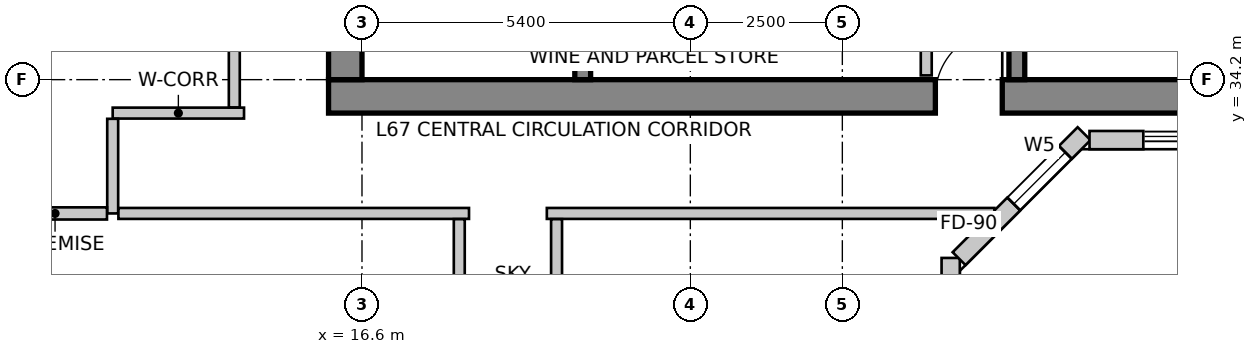
"""IFC4 building model, lengths in metres.
Left out: names, types, materials, properties, quantities, classifications, styles, units other than length and angle.
Written with IfcOpenShell. Run it as: python <this file> out.ifc"""

import sys

from ifc_helpers import new_model, si_unit, direction, frame, frame_2d, origin, place, context, subcontext, project, spatial, rectangle, extrude, source, transform, mapped, element, fill, save


model = new_model("IFC4")
c1 = context("Model", 3, precision=1e-05, world=origin(), true_north=direction((0.0, 1.0)))
c2 = subcontext(c1, "Body", "Model", "MODEL_VIEW")
j1 = project(units=[si_unit("LENGTHUNIT", "METRE"), si_unit("PLANEANGLEUNIT", "RADIAN")], contexts=[c1])
p1 = place(None, origin())
s1 = spatial("IfcSite", under=j1, at=p1, CompositionType="ELEMENT")
p2 = place(p1, origin())
s2 = spatial("IfcBuilding", under=s1, at=p2, CompositionType="ELEMENT")
p3 = place(p2, frame((0.0, 0.0, 263.7)))
s3 = spatial("IfcBuildingStorey", under=s2, at=p3, CompositionType="ELEMENT", Elevation=263.7)
p4 = place(p3, frame((16.05, 33.925, 0.0), z_axis=(0.0, 0.0, 1.0), x_axis=(1.0, 0.0, 0.0)))
e1 = element("IfcWall", 1, at=p4, inside=s3, PredefinedType="SHEAR", context=c2, shape_type="SweptSolid", body=[
    extrude(rectangle(XDim=15.5, YDim=0.55, at=frame_2d((7.75, 0.0))), origin(), (0.0, 0.0, 1.0), 3.6),
])
m1 = source(origin(), c2, "Body", "SweptSolid", [
    extrude(rectangle(XDim=1.1, YDim=2.15, at=frame_2d((0.55, 1.075))), frame((0.0, 0.285, 0.0), z_axis=(0.0, -1.0, 0.0), x_axis=(1.0, 0.0, 0.0)), (0.0, 0.0, 1.0), 0.57),
])
p5 = place(p4, frame((9.98, 0.0, 0.0)))
e2 = element("IfcOpeningElement", 2, at=p5, cuts=e1, PredefinedType="OPENING", context=c2, shape_type="MappedRepresentation", body=[
    mapped(m1, transform((0.0, 0.0, 0.0), scale=1.0)),
])
p6 = place(p3, frame((16.325, 34.2, 0.0), z_axis=(0.0, 0.0, 1.0), x_axis=(0.0, 1.0, 0.0)))
e3 = element("IfcWall", 3, at=p6, inside=s3, PredefinedType="SHEAR", context=c2, shape_type="SweptSolid", body=[
    extrude(rectangle(XDim=11.4, YDim=0.55, at=frame_2d((5.7, 0.0))), origin(), (0.0, 0.0, 1.0), 3.6),
])
p7 = place(p6, frame((7.15, 0.0, 0.0)))
e4 = element("IfcOpeningElement", 4, at=p7, cuts=e3, PredefinedType="OPENING", context=c2, shape_type="MappedRepresentation", body=[
    mapped(m1, transform((0.0, 0.0, 0.0), scale=1.0)),
])
p8 = place(p3, frame((20.23, 34.2, 0.0), z_axis=(0.0, 0.0, 1.0), x_axis=(0.0, 1.0, 0.0)))
e5 = element("IfcWall", 5, at=p8, inside=s3, PredefinedType="SHEAR", context=c2, shape_type="SweptSolid", body=[
    extrude(rectangle(XDim=9.06, YDim=0.26, at=frame_2d((4.53, 0.0))), origin(), (0.0, 0.0, 1.0), 3.6),
])
m2 = source(origin(), c2, "Body", "SweptSolid", [
    extrude(rectangle(XDim=1.1, YDim=2.15, at=frame_2d((0.55, 1.075))), frame((0.0, 0.14, 0.0), z_axis=(0.0, -1.0, 0.0), x_axis=(1.0, 0.0, 0.0)), (0.0, 0.0, 1.0), 0.28),
])
p9 = place(p8, frame((7.45, 0.0, 0.0)))
e6 = element("IfcOpeningElement", 6, at=p9, cuts=e5, PredefinedType="OPENING", context=c2, shape_type="MappedRepresentation", body=[
    mapped(m2, transform((0.0, 0.0, 0.0), scale=1.0)),
])
p10 = place(p3, frame((27.37, 34.2, 0.0), z_axis=(0.0, 0.0, 1.0), x_axis=(0.0, 1.0, 0.0)))
e7 = element("IfcWall", 7, at=p10, inside=s3, PredefinedType="SHEAR", context=c2, shape_type="SweptSolid", body=[
    extrude(rectangle(XDim=9.06, YDim=0.26, at=frame_2d((4.53, 0.0))), origin(), (0.0, 0.0, 1.0), 3.6),
])
p11 = place(p10, frame((7.45, 0.0, 0.0)))
e8 = element("IfcOpeningElement", 8, at=p11, cuts=e7, PredefinedType="OPENING", context=c2, shape_type="MappedRepresentation", body=[
    mapped(m2, transform((0.0, 0.0, 0.0), scale=1.0)),
])
p12 = place(p3, frame((26.282, 21.557, 0.0), z_axis=(0.0, 0.0, 1.0), x_axis=(0.0, 1.0, 0.0)))
e9 = element("IfcWall", 9, at=p12, inside=s3, PredefinedType="SOLIDWALL", context=c2, shape_type="SweptSolid", body=[
    extrude(rectangle(XDim=9.711, YDim=0.3, at=frame_2d((4.855, 0.0))), origin(), (0.0, 0.0, 1.0), 3.35),
])
m3 = source(origin(), c2, "Body", "SweptSolid", [
    extrude(rectangle(XDim=2.1, YDim=2.0, at=frame_2d((1.05, 1.0))), frame((0.0, 0.16, 0.0), z_axis=(0.0, -1.0, 0.0), x_axis=(1.0, 0.0, 0.0)), (0.0, 0.0, 1.0), 0.32),
])
p13 = place(p12, frame((1.538, 0.0, 0.85)))
e10 = element("IfcOpeningElement", 10, at=p13, cuts=e9, PredefinedType="OPENING", context=c2, shape_type="MappedRepresentation", body=[
    mapped(m3, transform((0.0, 0.0, 0.0), scale=1.0)),
])
m4 = source(origin(), c2, "Body", "SweptSolid", [
    extrude(rectangle(XDim=2.4, YDim=2.2, at=frame_2d((1.2, 1.1))), frame((0.0, 0.16, 0.0), z_axis=(0.0, -1.0, 0.0), x_axis=(1.0, 0.0, 0.0)), (0.0, 0.0, 1.0), 0.32),
])
p14 = place(p12, frame((5.923, 0.0, 0.85)))
e11 = element("IfcOpeningElement", 11, at=p14, cuts=e9, PredefinedType="OPENING", context=c2, shape_type="MappedRepresentation", body=[
    mapped(m4, transform((0.0, 0.0, 0.0), scale=1.0)),
])
p15 = place(p3, frame((26.42, 31.256, 0.0), z_axis=(0.0, 0.0, 1.0), x_axis=(0.707106781187, 0.707106781187, 0.0)))
e12 = element("IfcWall", 12, at=p15, inside=s3, PredefinedType="SOLIDWALL", context=c2, shape_type="SweptSolid", body=[
    extrude(rectangle(XDim=2.907, YDim=0.3, at=frame_2d((1.454, 0.0))), origin(), (0.0, 0.0, 1.0), 3.35),
])
m5 = source(origin(), c2, "Body", "SweptSolid", [
    extrude(rectangle(XDim=1.2, YDim=1.6, at=frame_2d((0.6, 0.8))), frame((0.0, 0.16, 0.0), z_axis=(0.0, -1.0, 0.0), x_axis=(1.0, 0.0, 0.0)), (0.0, 0.0, 1.0), 0.32),
])
p16 = place(p15, frame((1.272, 0.0, 0.85)))
e13 = element("IfcOpeningElement", 13, at=p16, cuts=e12, PredefinedType="OPENING", context=c2, shape_type="MappedRepresentation", body=[
    mapped(m5, transform((0.0, 0.0, 0.0), scale=1.0)),
])
p17 = place(p3, frame((28.565, 33.206, 0.0), z_axis=(0.0, 0.0, 1.0), x_axis=(1.0, 0.0, 0.0)))
e14 = element("IfcWall", 14, at=p17, inside=s3, PredefinedType="SOLIDWALL", context=c2, shape_type="SweptSolid", body=[
    extrude(rectangle(XDim=0.885, YDim=0.3, at=frame_2d((0.442, 0.0))), origin(), (0.0, 0.0, 1.0), 3.35),
])
p18 = place(p3, frame((13.269, 47.134, 0.0), z_axis=(0.0, 0.0, 1.0), x_axis=(-0.3199211297, -0.947444178182, 0.0)))
e15 = element("IfcWall", 15, at=p18, inside=s3, PredefinedType="SOLIDWALL", context=c2, shape_type="SweptSolid", body=[
    extrude(rectangle(XDim=16.132, YDim=0.3, at=frame_2d((8.066, 0.0))), origin(), (0.0, 0.0, 1.0), 3.35),
])
p19 = place(p18, frame((2.585, 0.0, 0.85)))
e16 = element("IfcOpeningElement", 16, at=p19, cuts=e15, PredefinedType="OPENING", context=c2, shape_type="MappedRepresentation", body=[
    mapped(m3, transform((0.0, 0.0, 0.0), scale=1.0)),
])
p20 = place(p18, frame((7.267, 0.0, 0.85)))
e17 = element("IfcOpeningElement", 17, at=p20, cuts=e15, PredefinedType="OPENING", context=c2, shape_type="MappedRepresentation", body=[
    mapped(m4, transform((0.0, 0.0, 0.0), scale=1.0)),
])
p21 = place(p18, frame((12.249, 0.0, 0.85)))
e18 = element("IfcOpeningElement", 18, at=p21, cuts=e15, PredefinedType="OPENING", context=c2, shape_type="MappedRepresentation", body=[
    mapped(m3, transform((0.0, 0.0, 0.0), scale=1.0)),
])
p22 = place(p3, frame((25.88, 35.956, 0.0), z_axis=(0.0, 0.0, 1.0), x_axis=(0.0, -1.0, 0.0)))
e19 = element("IfcWall", 19, at=p22, inside=s3, PredefinedType="PARTITIONING", context=c2, shape_type="SweptSolid", body=[
    extrude(rectangle(XDim=1.686, YDim=0.18, at=frame_2d((0.843, 0.0))), origin(), (0.0, 0.0, 1.0), 2.642),
])
p23 = place(p3, frame((12.5, 33.65, 0.0), z_axis=(0.0, 0.0, 1.0), x_axis=(1.0, 0.0, 0.0)))
e20 = element("IfcWall", 20, at=p23, inside=s3, PredefinedType="PARTITIONING", context=c2, shape_type="SweptSolid", body=[
    extrude(rectangle(XDim=2.16, YDim=0.18, at=frame_2d((1.08, 0.0))), origin(), (0.0, 0.0, 1.0), 3.35),
])
p24 = place(p3, frame((12.5, 32.0, 0.0), z_axis=(0.0, 0.0, 1.0), x_axis=(0.0, 1.0, 0.0)))
e21 = element("IfcWall", 21, at=p24, inside=s3, PredefinedType="PARTITIONING", context=c2, shape_type="SweptSolid", body=[
    extrude(rectangle(XDim=1.556, YDim=0.18, at=frame_2d((0.778, 0.0))), origin(), (0.0, 0.0, 1.0), 3.019),
])
p25 = place(p3, frame((18.36, 32.0, 0.0), z_axis=(0.0, 0.0, 1.0), x_axis=(-1.0, 0.0, 0.0)))
e22 = element("IfcWall", 22, at=p25, inside=s3, PredefinedType="PARTITIONING", context=c2, shape_type="SweptSolid", body=[
    extrude(rectangle(XDim=5.766, YDim=0.18, at=frame_2d((2.883, 0.0))), origin(), (0.0, 0.0, 1.0), 3.019),
])
p26 = place(p3, frame((27.001, 32.0, 0.0), z_axis=(0.0, 0.0, 1.0), x_axis=(-1.0, 0.0, 0.0)))
e23 = element("IfcWall", 23, at=p26, inside=s3, PredefinedType="PARTITIONING", context=c2, shape_type="SweptSolid", body=[
    extrude(rectangle(XDim=7.361, YDim=0.18, at=frame_2d((3.681, 0.0))), origin(), (0.0, 0.0, 1.0), 3.019),
])
p27 = place(p3, frame((14.5, 33.744, 0.0), z_axis=(0.0, 0.0, 1.0), x_axis=(0.0, 1.0, 0.0)))
e24 = element("IfcWall", 24, at=p27, inside=s3, PredefinedType="PARTITIONING", context=c2, shape_type="SweptSolid", body=[
    extrude(rectangle(XDim=12.406, YDim=0.18, at=frame_2d((6.203, 0.0))), origin(), (0.0, 0.0, 1.0), 3.35),
])
m6 = source(origin(), c2, "Body", "SweptSolid", [
    extrude(rectangle(XDim=0.9, YDim=2.15, at=frame_2d((0.45, 1.075))), frame((0.0, 0.1, 0.0), z_axis=(0.0, -1.0, 0.0), x_axis=(1.0, 0.0, 0.0)), (0.0, 0.0, 1.0), 0.2),
])
p28 = place(p27, frame((4.37, 0.0, 0.0)))
e25 = element("IfcOpeningElement", 25, at=p28, cuts=e24, PredefinedType="OPENING", context=c2, shape_type="MappedRepresentation", body=[
    mapped(m6, transform((0.0, 0.0, 0.0), scale=1.0)),
])
p29 = place(p3, frame((12.406, 32.0, 0.0), z_axis=(0.0, 0.0, 1.0), x_axis=(-1.0, 0.0, 0.0)))
e26 = element("IfcWall", 26, at=p29, inside=s3, PredefinedType="PARTITIONING", context=c2, shape_type="SweptSolid", body=[
    extrude(rectangle(XDim=1.708, YDim=0.2, at=frame_2d((0.854, 0.0))), origin(), (0.0, 0.0, 1.0), 2.642),
])
p30 = place(p3, frame((18.2, 24.872, 0.0), z_axis=(0.0, 0.0, 1.0), x_axis=(0.0, 1.0, 0.0)))
e27 = element("IfcWall", 27, at=p30, inside=s3, PredefinedType="PARTITIONING", context=c2, shape_type="SweptSolid", body=[
    extrude(rectangle(XDim=7.034, YDim=0.18, at=frame_2d((3.517, 0.0))), origin(), (0.0, 0.0, 1.0), 2.879),
])
p31 = place(p30, frame((3.067, 0.0, 0.0)))
e28 = element("IfcOpeningElement", 28, at=p31, cuts=e27, PredefinedType="OPENING", context=c2, shape_type="MappedRepresentation", body=[
    mapped(m6, transform((0.0, 0.0, 0.0), scale=1.0)),
])
p32 = place(p3, frame((19.8, 31.906, 0.0), z_axis=(0.0, 0.0, 1.0), x_axis=(0.0, -1.0, 0.0)))
e29 = element("IfcWall", 29, at=p32, inside=s3, PredefinedType="PARTITIONING", context=c2, shape_type="SweptSolid", body=[
    extrude(rectangle(XDim=10.841, YDim=0.18, at=frame_2d((5.42, 0.0))), origin(), (0.0, 0.0, 1.0), 2.879),
])
p33 = place(p32, frame((4.97, 0.0, 0.0)))
e30 = element("IfcOpeningElement", 30, at=p33, cuts=e29, PredefinedType="OPENING", context=c2, shape_type="MappedRepresentation", body=[
    mapped(m6, transform((0.0, 0.0, 0.0), scale=1.0)),
])
m7 = source(origin(), c2, "Body", "SweptSolid", [
    extrude(rectangle(XDim=1.2, YDim=1.6, at=frame_2d((0.6, 0.8))), frame((0.0, -0.015, 0.0), z_axis=(0.0, -1.0, 0.0), x_axis=(1.0, 0.0, 0.0)), (0.0, 0.0, 1.0), 0.06),
])
p34 = place(p16, origin())
e31 = element("IfcWindow", 31, at=p34, inside=s3, PartitioningType="SINGLE_PANEL", PredefinedType="WINDOW", context=c2, shape_type="MappedRepresentation", body=[
    mapped(m7, transform((0.0, 0.0, 0.0), scale=1.0)),
])
fill(e13, e31)
m8 = source(origin(), c2, "Body", "SweptSolid", [
    extrude(rectangle(XDim=1.1, YDim=2.15, at=frame_2d((0.55, 1.075))), frame((0.0, 0.025, 0.0), z_axis=(0.0, -1.0, 0.0), x_axis=(1.0, 0.0, 0.0)), (0.0, 0.0, 1.0), 0.05),
])
p35 = place(p5, origin())
e32 = element("IfcDoor", 32, at=p35, inside=s3, OperationType="SINGLE_SWING_RIGHT", PredefinedType="DOOR", context=c2, shape_type="MappedRepresentation", body=[
    mapped(m8, transform((0.0, 0.0, 0.0), scale=1.0)),
])
fill(e2, e32)
save(model, sys.argv[1])
